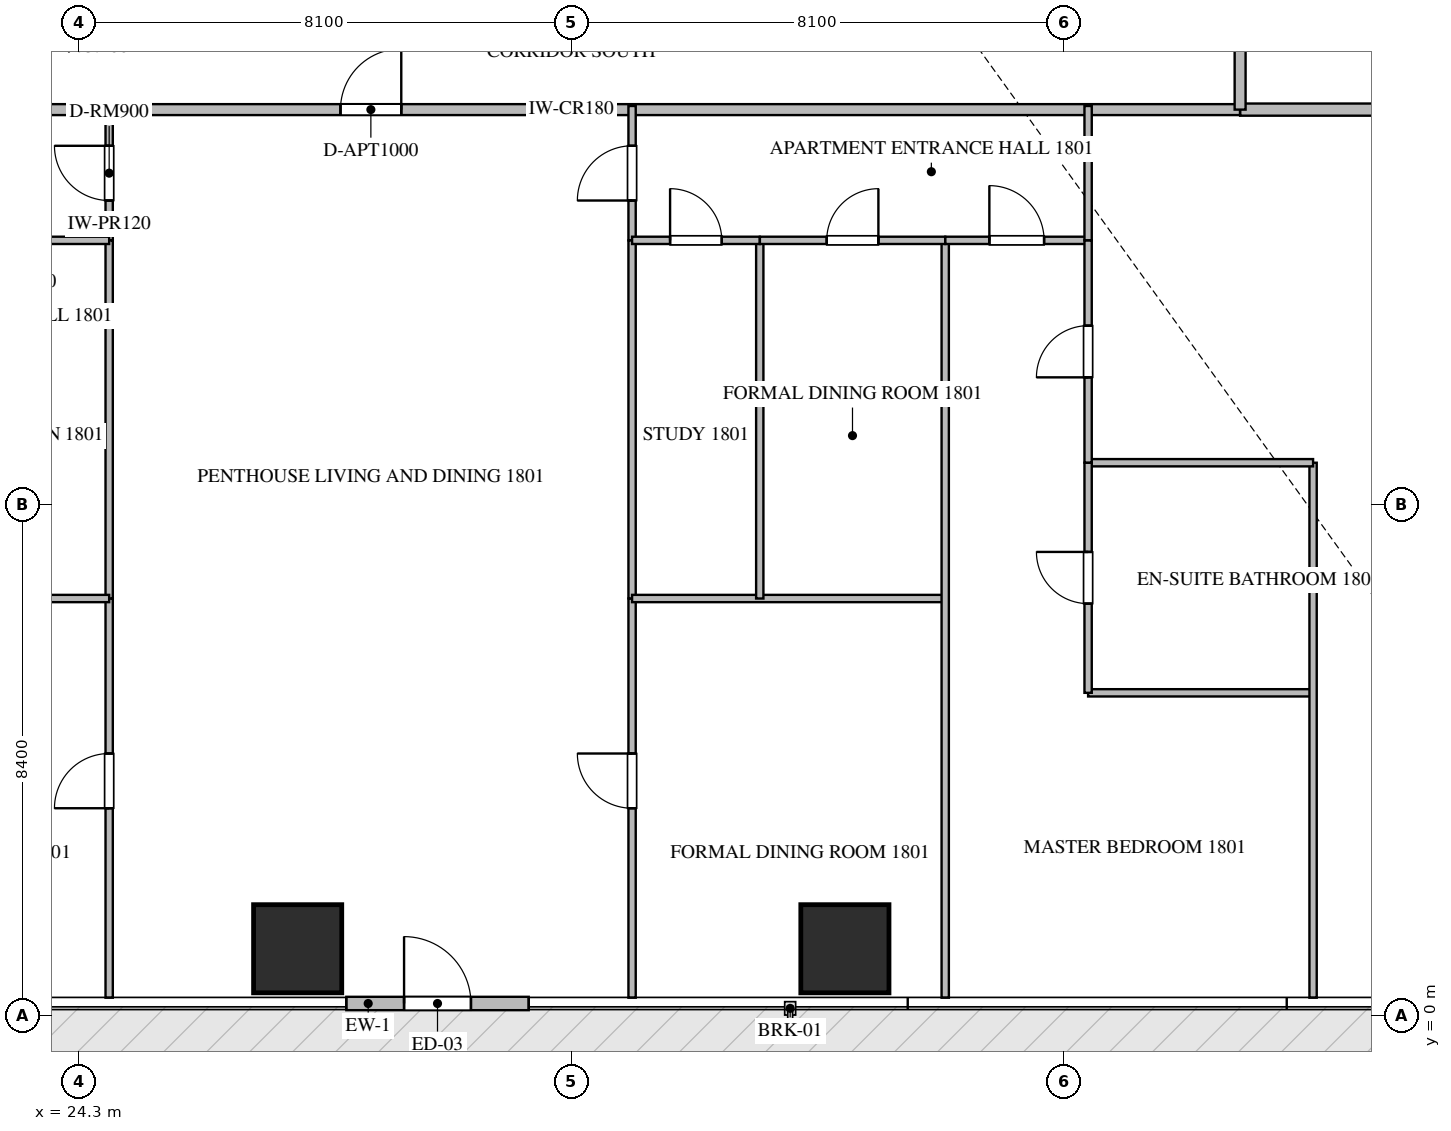
"""IFC4 building model, lengths in metres.
Left out: names, types, materials, properties, quantities, classifications, styles, units other than length and angle.
Written with IfcOpenShell. Run it as: python <this file> out.ifc"""

import sys

from ifc_helpers import new_model, si_unit, direction, frame, frame_2d, origin, origin_2d, place, context, subcontext, project, spatial, rectangle, extrude, source, transform, mapped, element, fill, save


model = new_model("IFC4")
c1 = context("Model", 3, precision=1e-05, world=origin(), true_north=direction((0.0, 1.0)))
c2 = subcontext(c1, "Body", "Model", "MODEL_VIEW")
j1 = project(units=[si_unit("LENGTHUNIT", "METRE"), si_unit("PLANEANGLEUNIT", "RADIAN")], contexts=[c1])
p1 = place(None, origin())
s1 = spatial("IfcSite", under=j1, at=p1, CompositionType="ELEMENT")
p2 = place(p1, origin())
s2 = spatial("IfcBuilding", under=s1, at=p2, CompositionType="ELEMENT")
p3 = place(p2, frame((0.0, 0.0, 75.45)))
s3 = spatial("IfcBuildingStorey", under=s2, at=p3, CompositionType="ELEMENT", Elevation=75.45)
m1 = source(origin(), c2, "Body", "SweptSolid", [
    extrude(rectangle(XDim=1.45, YDim=1.45, at=origin_2d()), origin(), (0.0, 0.0, 1.0), 3.75),
])
for number, where, z_axis, x_axis in (
    (1, (27.9, 1.1, -0.26), (0.0, 0.0, 1.0), (1.0, 0.0, 0.0)),
    (2, (36.9, 1.1, -0.26), (0.0, 0.0, 1.0), (1.0, 0.0, 0.0)),
):
    element("IfcColumn", number, at=place(p3, frame(where, z_axis=z_axis, x_axis=x_axis)), inside=s3, PredefinedType="COLUMN", context=c2, shape_type="MappedRepresentation", body=[
        mapped(m1, transform((0.0, 0.0, 0.0), scale=1.0)),
    ])
p4 = place(p3, frame((28.7, 0.2, 0.0), z_axis=(0.0, 0.0, 1.0), x_axis=(1.0, 0.0, 0.0)))
e3 = element("IfcWall", 3, at=p4, inside=s3, PredefinedType="ELEMENTEDWALL", context=c2, shape_type="SweptSolid", body=[
    extrude(rectangle(XDim=3.0, YDim=0.22, at=frame_2d((1.5, 0.0))), origin(), (0.0, 0.0, 1.0), 3.475),
])
p5 = place(p4, frame((0.95, 0.0, 0.0)))
e4 = element("IfcOpeningElement", 4, at=p5, cuts=e3, PredefinedType="OPENING", context=c2, shape_type="SweptSolid", body=[
    extrude(rectangle(XDim=1.1, YDim=2.2, at=frame_2d((0.55, 1.1))), frame((0.0, 0.12, 0.0), z_axis=(0.0, -1.0, 0.0), x_axis=(1.0, 0.0, 0.0)), (0.0, 0.0, 1.0), 0.24),
])
p6 = place(p3, frame((43.4, 14.9, 0.0), z_axis=(0.0, 0.0, 1.0), x_axis=(1.0, 0.0, 0.0)))
e5 = element("IfcWall", 5, at=p6, inside=s3, PredefinedType="PARTITIONING", context=c2, shape_type="SweptSolid", body=[
    extrude(rectangle(XDim=15.318, YDim=0.2, at=frame_2d((7.659, 0.0))), origin(), (0.0, 0.0, 1.0), 3.49),
])
p7 = place(p3, frame((21.402, 14.9, 0.0), z_axis=(0.0, 0.0, 1.0), x_axis=(1.0, 0.0, 0.0)))
e6 = element("IfcWall", 6, at=p7, inside=s3, PredefinedType="PARTITIONING", context=c2, shape_type="SweptSolid", body=[
    extrude(rectangle(XDim=21.996, YDim=0.18, at=frame_2d((10.998, 0.0))), origin(), (0.0, 0.0, 1.0), 3.49),
])
p8 = place(p7, frame((7.202, 0.0, 0.0)))
e7 = element("IfcOpeningElement", 7, at=p8, cuts=e6, PredefinedType="OPENING", context=c2, shape_type="SweptSolid", body=[
    extrude(rectangle(XDim=1.0, YDim=2.15, at=frame_2d((0.5, 1.075))), frame((0.0, 0.1, 0.0), z_axis=(0.0, -1.0, 0.0), x_axis=(1.0, 0.0, 0.0)), (0.0, 0.0, 1.0), 0.2),
])
p9 = place(p3, frame((43.4, 14.9, 0.0), z_axis=(0.0, 0.0, 1.0), x_axis=(0.0, 1.0, 0.0)))
e8 = element("IfcWall", 8, at=p9, inside=s3, PredefinedType="PARTITIONING", context=c2, shape_type="SweptSolid", body=[
    extrude(rectangle(XDim=20.6, YDim=0.18, at=frame_2d((10.3, 0.0))), origin(), (0.0, 0.0, 1.0), 3.49),
])
p10 = place(p9, frame((17.64, 0.0, 0.0)))
e9 = element("IfcOpeningElement", 9, at=p10, cuts=e8, PredefinedType="OPENING", context=c2, shape_type="SweptSolid", body=[
    extrude(rectangle(XDim=1.0, YDim=2.15, at=frame_2d((0.5, 1.075))), frame((0.0, 0.1, 0.0), z_axis=(0.0, -1.0, 0.0), x_axis=(1.0, 0.0, 0.0)), (0.0, 0.0, 1.0), 0.2),
])
p11 = place(p3, frame((24.8, 12.75, 0.0), z_axis=(0.0, 0.0, 1.0), x_axis=(0.0, 1.0, 0.0)))
e10 = element("IfcWall", 10, at=p11, inside=s3, PredefinedType="PARTITIONING", context=c2, shape_type="SweptSolid", body=[
    extrude(rectangle(XDim=2.21, YDim=0.12, at=frame_2d((1.105, 0.0))), origin(), (0.0, 0.0, 1.0), 3.49),
])
p12 = place(p11, frame((0.655, 0.0, 0.0)))
e11 = element("IfcOpeningElement", 11, at=p12, cuts=e10, PredefinedType="OPENING", context=c2, shape_type="SweptSolid", body=[
    extrude(rectangle(XDim=0.9, YDim=2.1, at=frame_2d((0.45, 1.05))), frame((0.0, 0.07, 0.0), z_axis=(0.0, -1.0, 0.0), x_axis=(1.0, 0.0, 0.0)), (0.0, 0.0, 1.0), 0.14),
])
p13 = place(p3, frame((24.8, 0.295, 0.0), z_axis=(0.0, 0.0, 1.0), x_axis=(0.0, 1.0, 0.0)))
e12 = element("IfcWall", 12, at=p13, inside=s3, PredefinedType="PARTITIONING", context=c2, shape_type="SweptSolid", body=[
    extrude(rectangle(XDim=6.565, YDim=0.12, at=frame_2d((3.283, 0.0))), origin(), (0.0, 0.0, 1.0), 3.49),
])
p14 = place(p13, frame((3.116, 0.0, 0.0)))
e13 = element("IfcOpeningElement", 13, at=p14, cuts=e12, PredefinedType="OPENING", context=c2, shape_type="SweptSolid", body=[
    extrude(rectangle(XDim=0.9, YDim=2.1, at=frame_2d((0.45, 1.05))), frame((0.0, 0.07, 0.0), z_axis=(0.0, -1.0, 0.0), x_axis=(1.0, 0.0, 0.0)), (0.0, 0.0, 1.0), 0.14),
])
p15 = place(p3, frame((24.8, 6.862, 0.0), z_axis=(0.0, 0.0, 1.0), x_axis=(0.0, 1.0, 0.0)))
e14 = element("IfcWall", 14, at=p15, inside=s3, PredefinedType="PARTITIONING", context=c2, shape_type="SweptSolid", body=[
    extrude(rectangle(XDim=5.886, YDim=0.12, at=frame_2d((2.943, 0.0))), origin(), (0.0, 0.0, 1.0), 3.49),
])
p16 = place(p3, frame((19.65, 6.86, 0.0), z_axis=(0.0, 0.0, 1.0), x_axis=(1.0, 0.0, 0.0)))
e15 = element("IfcWall", 15, at=p16, inside=s3, PredefinedType="PARTITIONING", context=c2, shape_type="SweptSolid", body=[
    extrude(rectangle(XDim=5.15, YDim=0.12, at=frame_2d((2.575, 0.0))), origin(), (0.0, 0.0, 1.0), 3.49),
])
p17 = place(p3, frame((21.752, 12.75, 0.0), z_axis=(0.0, 0.0, 1.0), x_axis=(1.0, 0.0, 0.0)))
e16 = element("IfcWall", 16, at=p17, inside=s3, PredefinedType="PARTITIONING", context=c2, shape_type="SweptSolid", body=[
    extrude(rectangle(XDim=3.048, YDim=0.12, at=frame_2d((1.524, 0.0))), origin(), (0.0, 0.0, 1.0), 3.49),
])
p18 = place(p17, frame((1.099, 0.0, 0.0)))
e17 = element("IfcOpeningElement", 17, at=p18, cuts=e16, PredefinedType="OPENING", context=c2, shape_type="SweptSolid", body=[
    extrude(rectangle(XDim=0.85, YDim=2.1, at=frame_2d((0.425, 1.05))), frame((0.0, 0.07, 0.0), z_axis=(0.0, -1.0, 0.0), x_axis=(1.0, 0.0, 0.0)), (0.0, 0.0, 1.0), 0.14),
])
p19 = place(p3, frame((33.4, 12.75, 0.0), z_axis=(0.0, 0.0, 1.0), x_axis=(0.0, 1.0, 0.0)))
e18 = element("IfcWall", 18, at=p19, inside=s3, PredefinedType="PARTITIONING", context=c2, shape_type="SweptSolid", body=[
    extrude(rectangle(XDim=2.21, YDim=0.12, at=frame_2d((1.105, 0.0))), origin(), (0.0, 0.0, 1.0), 3.49),
])
p20 = place(p19, frame((0.655, 0.0, 0.0)))
e19 = element("IfcOpeningElement", 19, at=p20, cuts=e18, PredefinedType="OPENING", context=c2, shape_type="SweptSolid", body=[
    extrude(rectangle(XDim=0.9, YDim=2.1, at=frame_2d((0.45, 1.05))), frame((0.0, 0.07, 0.0), z_axis=(0.0, -1.0, 0.0), x_axis=(1.0, 0.0, 0.0)), (0.0, 0.0, 1.0), 0.14),
])
p21 = place(p3, frame((33.4, 0.295, 0.0), z_axis=(0.0, 0.0, 1.0), x_axis=(0.0, 1.0, 0.0)))
e20 = element("IfcWall", 20, at=p21, inside=s3, PredefinedType="PARTITIONING", context=c2, shape_type="SweptSolid", body=[
    extrude(rectangle(XDim=6.565, YDim=0.12, at=frame_2d((3.283, 0.0))), origin(), (0.0, 0.0, 1.0), 3.49),
])
p22 = place(p21, frame((3.116, 0.0, 0.0)))
e21 = element("IfcOpeningElement", 21, at=p22, cuts=e20, PredefinedType="OPENING", context=c2, shape_type="SweptSolid", body=[
    extrude(rectangle(XDim=0.9, YDim=2.1, at=frame_2d((0.45, 1.05))), frame((0.0, 0.07, 0.0), z_axis=(0.0, -1.0, 0.0), x_axis=(1.0, 0.0, 0.0)), (0.0, 0.0, 1.0), 0.14),
])
p23 = place(p3, frame((33.4, 6.862, 0.0), z_axis=(0.0, 0.0, 1.0), x_axis=(0.0, 1.0, 0.0)))
e22 = element("IfcWall", 22, at=p23, inside=s3, PredefinedType="PARTITIONING", context=c2, shape_type="SweptSolid", body=[
    extrude(rectangle(XDim=5.886, YDim=0.12, at=frame_2d((2.943, 0.0))), origin(), (0.0, 0.0, 1.0), 3.49),
])
p24 = place(p3, frame((33.4, 6.86, 0.0), z_axis=(0.0, 0.0, 1.0), x_axis=(1.0, 0.0, 0.0)))
e23 = element("IfcWall", 23, at=p24, inside=s3, PredefinedType="PARTITIONING", context=c2, shape_type="SweptSolid", body=[
    extrude(rectangle(XDim=5.15, YDim=0.12, at=frame_2d((2.575, 0.0))), origin(), (0.0, 0.0, 1.0), 3.49),
])
p25 = place(p3, frame((38.55, 0.295, 0.0), z_axis=(0.0, 0.0, 1.0), x_axis=(0.0, 1.0, 0.0)))
e24 = element("IfcWall", 24, at=p25, inside=s3, PredefinedType="PARTITIONING", context=c2, shape_type="SweptSolid", body=[
    extrude(rectangle(XDim=12.455, YDim=0.12, at=frame_2d((6.228, 0.0))), origin(), (0.0, 0.0, 1.0), 3.49),
])
p26 = place(p3, frame((35.5, 6.86, 0.0), z_axis=(0.0, 0.0, 1.0), x_axis=(0.0, 1.0, 0.0)))
e25 = element("IfcWall", 25, at=p26, inside=s3, PredefinedType="PARTITIONING", context=c2, shape_type="SweptSolid", body=[
    extrude(rectangle(XDim=5.89, YDim=0.12, at=frame_2d((2.945, 0.0))), origin(), (0.0, 0.0, 1.0), 3.49),
])
p27 = place(p3, frame((33.4, 12.75, 0.0), z_axis=(0.0, 0.0, 1.0), x_axis=(1.0, 0.0, 0.0)))
e26 = element("IfcWall", 26, at=p27, inside=s3, PredefinedType="PARTITIONING", context=c2, shape_type="SweptSolid", body=[
    extrude(rectangle(XDim=2.1, YDim=0.12, at=frame_2d((1.05, 0.0))), origin(), (0.0, 0.0, 1.0), 3.49),
])
p28 = place(p27, frame((0.625, 0.0, 0.0)))
e27 = element("IfcOpeningElement", 27, at=p28, cuts=e26, PredefinedType="OPENING", context=c2, shape_type="SweptSolid", body=[
    extrude(rectangle(XDim=0.85, YDim=2.1, at=frame_2d((0.425, 1.05))), frame((0.0, 0.07, 0.0), z_axis=(0.0, -1.0, 0.0), x_axis=(1.0, 0.0, 0.0)), (0.0, 0.0, 1.0), 0.14),
])
p29 = place(p3, frame((35.502, 12.75, 0.0), z_axis=(0.0, 0.0, 1.0), x_axis=(1.0, 0.0, 0.0)))
e28 = element("IfcWall", 28, at=p29, inside=s3, PredefinedType="PARTITIONING", context=c2, shape_type="SweptSolid", body=[
    extrude(rectangle(XDim=3.048, YDim=0.12, at=frame_2d((1.524, 0.0))), origin(), (0.0, 0.0, 1.0), 3.49),
])
p30 = place(p29, frame((1.099, 0.0, 0.0)))
e29 = element("IfcOpeningElement", 29, at=p30, cuts=e28, PredefinedType="OPENING", context=c2, shape_type="SweptSolid", body=[
    extrude(rectangle(XDim=0.85, YDim=2.1, at=frame_2d((0.425, 1.05))), frame((0.0, 0.07, 0.0), z_axis=(0.0, -1.0, 0.0), x_axis=(1.0, 0.0, 0.0)), (0.0, 0.0, 1.0), 0.14),
])
p31 = place(p3, frame((38.552, 12.75, 0.0), z_axis=(0.0, 0.0, 1.0), x_axis=(1.0, 0.0, 0.0)))
e30 = element("IfcWall", 30, at=p31, inside=s3, PredefinedType="PARTITIONING", context=c2, shape_type="SweptSolid", body=[
    extrude(rectangle(XDim=2.348, YDim=0.12, at=frame_2d((1.174, 0.0))), origin(), (0.0, 0.0, 1.0), 3.49),
])
p32 = place(p31, frame((0.724, 0.0, 0.0)))
e31 = element("IfcOpeningElement", 31, at=p32, cuts=e30, PredefinedType="OPENING", context=c2, shape_type="SweptSolid", body=[
    extrude(rectangle(XDim=0.9, YDim=2.1, at=frame_2d((0.45, 1.05))), frame((0.0, 0.07, 0.0), z_axis=(0.0, -1.0, 0.0), x_axis=(1.0, 0.0, 0.0)), (0.0, 0.0, 1.0), 0.14),
])
p33 = place(p3, frame((40.9, 5.309, 0.0), z_axis=(0.0, 0.0, 1.0), x_axis=(1.0, 0.0, 0.0)))
e32 = element("IfcWall", 32, at=p33, inside=s3, PredefinedType="PARTITIONING", context=c2, shape_type="SweptSolid", body=[
    extrude(rectangle(XDim=3.7, YDim=0.12, at=frame_2d((1.85, 0.0))), origin(), (0.0, 0.0, 1.0), 3.49),
])
p34 = place(p3, frame((44.6, 0.295, 0.0), z_axis=(0.0, 0.0, 1.0), x_axis=(0.0, 1.0, 0.0)))
e33 = element("IfcWall", 33, at=p34, inside=s3, PredefinedType="PARTITIONING", context=c2, shape_type="SweptSolid", body=[
    extrude(rectangle(XDim=8.798, YDim=0.12, at=frame_2d((4.399, 0.0))), origin(), (0.0, 0.0, 1.0), 3.49),
])
p35 = place(p3, frame((40.9, 9.093, 0.0), z_axis=(0.0, 0.0, 1.0), x_axis=(1.0, 0.0, 0.0)))
e34 = element("IfcWall", 34, at=p35, inside=s3, PredefinedType="PARTITIONING", context=c2, shape_type="SweptSolid", body=[
    extrude(rectangle(XDim=3.7, YDim=0.12, at=frame_2d((1.85, 0.0))), origin(), (0.0, 0.0, 1.0), 3.49),
])
p36 = place(p3, frame((40.9, 5.309, 0.0), z_axis=(0.0, 0.0, 1.0), x_axis=(0.0, 1.0, 0.0)))
e35 = element("IfcWall", 35, at=p36, inside=s3, PredefinedType="PARTITIONING", context=c2, shape_type="SweptSolid", body=[
    extrude(rectangle(XDim=3.784, YDim=0.12, at=frame_2d((1.892, 0.0))), origin(), (0.0, 0.0, 1.0), 3.49),
])
p37 = place(p36, frame((1.467, 0.0, 0.0)))
e36 = element("IfcOpeningElement", 36, at=p37, cuts=e35, PredefinedType="OPENING", context=c2, shape_type="SweptSolid", body=[
    extrude(rectangle(XDim=0.85, YDim=2.1, at=frame_2d((0.425, 1.05))), frame((0.0, 0.07, 0.0), z_axis=(0.0, -1.0, 0.0), x_axis=(1.0, 0.0, 0.0)), (0.0, 0.0, 1.0), 0.14),
])
p38 = place(p3, frame((40.9, 9.095, 0.0), z_axis=(0.0, 0.0, 1.0), x_axis=(0.0, 1.0, 0.0)))
e37 = element("IfcWall", 37, at=p38, inside=s3, PredefinedType="PARTITIONING", context=c2, shape_type="SweptSolid", body=[
    extrude(rectangle(XDim=3.655, YDim=0.12, at=frame_2d((1.828, 0.0))), origin(), (0.0, 0.0, 1.0), 3.49),
])
p39 = place(p38, frame((1.402, 0.0, 0.0)))
e38 = element("IfcOpeningElement", 38, at=p39, cuts=e37, PredefinedType="OPENING", context=c2, shape_type="SweptSolid", body=[
    extrude(rectangle(XDim=0.85, YDim=2.1, at=frame_2d((0.425, 1.05))), frame((0.0, 0.07, 0.0), z_axis=(0.0, -1.0, 0.0), x_axis=(1.0, 0.0, 0.0)), (0.0, 0.0, 1.0), 0.14),
])
p40 = place(p3, frame((40.9, 12.752, 0.0), z_axis=(0.0, 0.0, 1.0), x_axis=(0.0, 1.0, 0.0)))
e39 = element("IfcWall", 39, at=p40, inside=s3, PredefinedType="PARTITIONING", context=c2, shape_type="SweptSolid", body=[
    extrude(rectangle(XDim=2.208, YDim=0.12, at=frame_2d((1.104, 0.0))), origin(), (0.0, 0.0, 1.0), 3.49),
])
m2 = source(origin(), c2, "Body", "SweptSolid", [
    extrude(rectangle(XDim=1.1, YDim=2.2, at=frame_2d((0.55, 1.1))), frame((0.0, 0.025, 0.0), z_axis=(0.0, -1.0, 0.0), x_axis=(1.0, 0.0, 0.0)), (0.0, 0.0, 1.0), 0.05),
])
p41 = place(p5, origin())
e40 = element("IfcDoor", 40, at=p41, inside=s3, OperationType="SINGLE_SWING_LEFT", PredefinedType="DOOR", context=c2, shape_type="MappedRepresentation", body=[
    mapped(m2, transform((0.0, 0.0, 0.0), scale=1.0)),
])
fill(e4, e40)
m3 = source(origin(), c2, "Body", "SweptSolid", [
    extrude(rectangle(XDim=1.0, YDim=2.15, at=frame_2d((0.5, 1.075))), frame((0.0, 0.025, 0.0), z_axis=(0.0, -1.0, 0.0), x_axis=(1.0, 0.0, 0.0)), (0.0, 0.0, 1.0), 0.05),
])
p42 = place(p8, origin())
e41 = element("IfcDoor", 41, at=p42, inside=s3, OperationType="SINGLE_SWING_RIGHT", PredefinedType="DOOR", context=c2, shape_type="MappedRepresentation", body=[
    mapped(m3, transform((0.0, 0.0, 0.0), scale=1.0)),
])
fill(e7, e41)
m4 = source(origin(), c2, "Body", "SweptSolid", [
    extrude(rectangle(XDim=0.9, YDim=2.1, at=frame_2d((0.45, 1.05))), frame((0.0, 0.025, 0.0), z_axis=(0.0, -1.0, 0.0), x_axis=(1.0, 0.0, 0.0)), (0.0, 0.0, 1.0), 0.05),
])
p43 = place(p12, origin())
e42 = element("IfcDoor", 42, at=p43, inside=s3, OperationType="SINGLE_SWING_RIGHT", PredefinedType="DOOR", context=c2, shape_type="MappedRepresentation", body=[
    mapped(m4, transform((0.0, 0.0, 0.0), scale=1.0)),
])
fill(e11, e42)
p44 = place(p14, origin())
e43 = element("IfcDoor", 43, at=p44, inside=s3, OperationType="SINGLE_SWING_LEFT", PredefinedType="DOOR", context=c2, shape_type="MappedRepresentation", body=[
    mapped(m4, transform((0.0, 0.0, 0.0), scale=1.0)),
])
fill(e13, e43)
p45 = place(p20, origin())
e44 = element("IfcDoor", 44, at=p45, inside=s3, OperationType="SINGLE_SWING_LEFT", PredefinedType="DOOR", context=c2, shape_type="MappedRepresentation", body=[
    mapped(m4, transform((0.0, 0.0, 0.0), scale=1.0)),
])
fill(e19, e44)
p46 = place(p22, origin())
e45 = element("IfcDoor", 45, at=p46, inside=s3, OperationType="SINGLE_SWING_RIGHT", PredefinedType="DOOR", context=c2, shape_type="MappedRepresentation", body=[
    mapped(m4, transform((0.0, 0.0, 0.0), scale=1.0)),
])
fill(e21, e45)
m5 = source(origin(), c2, "Body", "SweptSolid", [
    extrude(rectangle(XDim=0.85, YDim=2.1, at=frame_2d((0.425, 1.05))), frame((0.0, 0.025, 0.0), z_axis=(0.0, -1.0, 0.0), x_axis=(1.0, 0.0, 0.0)), (0.0, 0.0, 1.0), 0.05),
])
p47 = place(p28, origin())
e46 = element("IfcDoor", 46, at=p47, inside=s3, OperationType="SINGLE_SWING_LEFT", PredefinedType="DOOR", context=c2, shape_type="MappedRepresentation", body=[
    mapped(m5, transform((0.0, 0.0, 0.0), scale=1.0)),
])
fill(e27, e46)
p48 = place(p30, origin())
e47 = element("IfcDoor", 47, at=p48, inside=s3, OperationType="SINGLE_SWING_RIGHT", PredefinedType="DOOR", context=c2, shape_type="MappedRepresentation", body=[
    mapped(m5, transform((0.0, 0.0, 0.0), scale=1.0)),
])
fill(e29, e47)
p49 = place(p32, origin())
e48 = element("IfcDoor", 48, at=p49, inside=s3, OperationType="SINGLE_SWING_LEFT", PredefinedType="DOOR", context=c2, shape_type="MappedRepresentation", body=[
    mapped(m4, transform((0.0, 0.0, 0.0), scale=1.0)),
])
fill(e31, e48)
p50 = place(p37, origin())
e49 = element("IfcDoor", 49, at=p50, inside=s3, OperationType="SINGLE_SWING_RIGHT", PredefinedType="DOOR", context=c2, shape_type="MappedRepresentation", body=[
    mapped(m5, transform((0.0, 0.0, 0.0), scale=1.0)),
])
fill(e36, e49)
p51 = place(p39, origin())
e50 = element("IfcDoor", 50, at=p51, inside=s3, OperationType="SINGLE_SWING_LEFT", PredefinedType="DOOR", context=c2, shape_type="MappedRepresentation", body=[
    mapped(m5, transform((0.0, 0.0, 0.0), scale=1.0)),
])
fill(e38, e50)
save(model, sys.argv[1])
